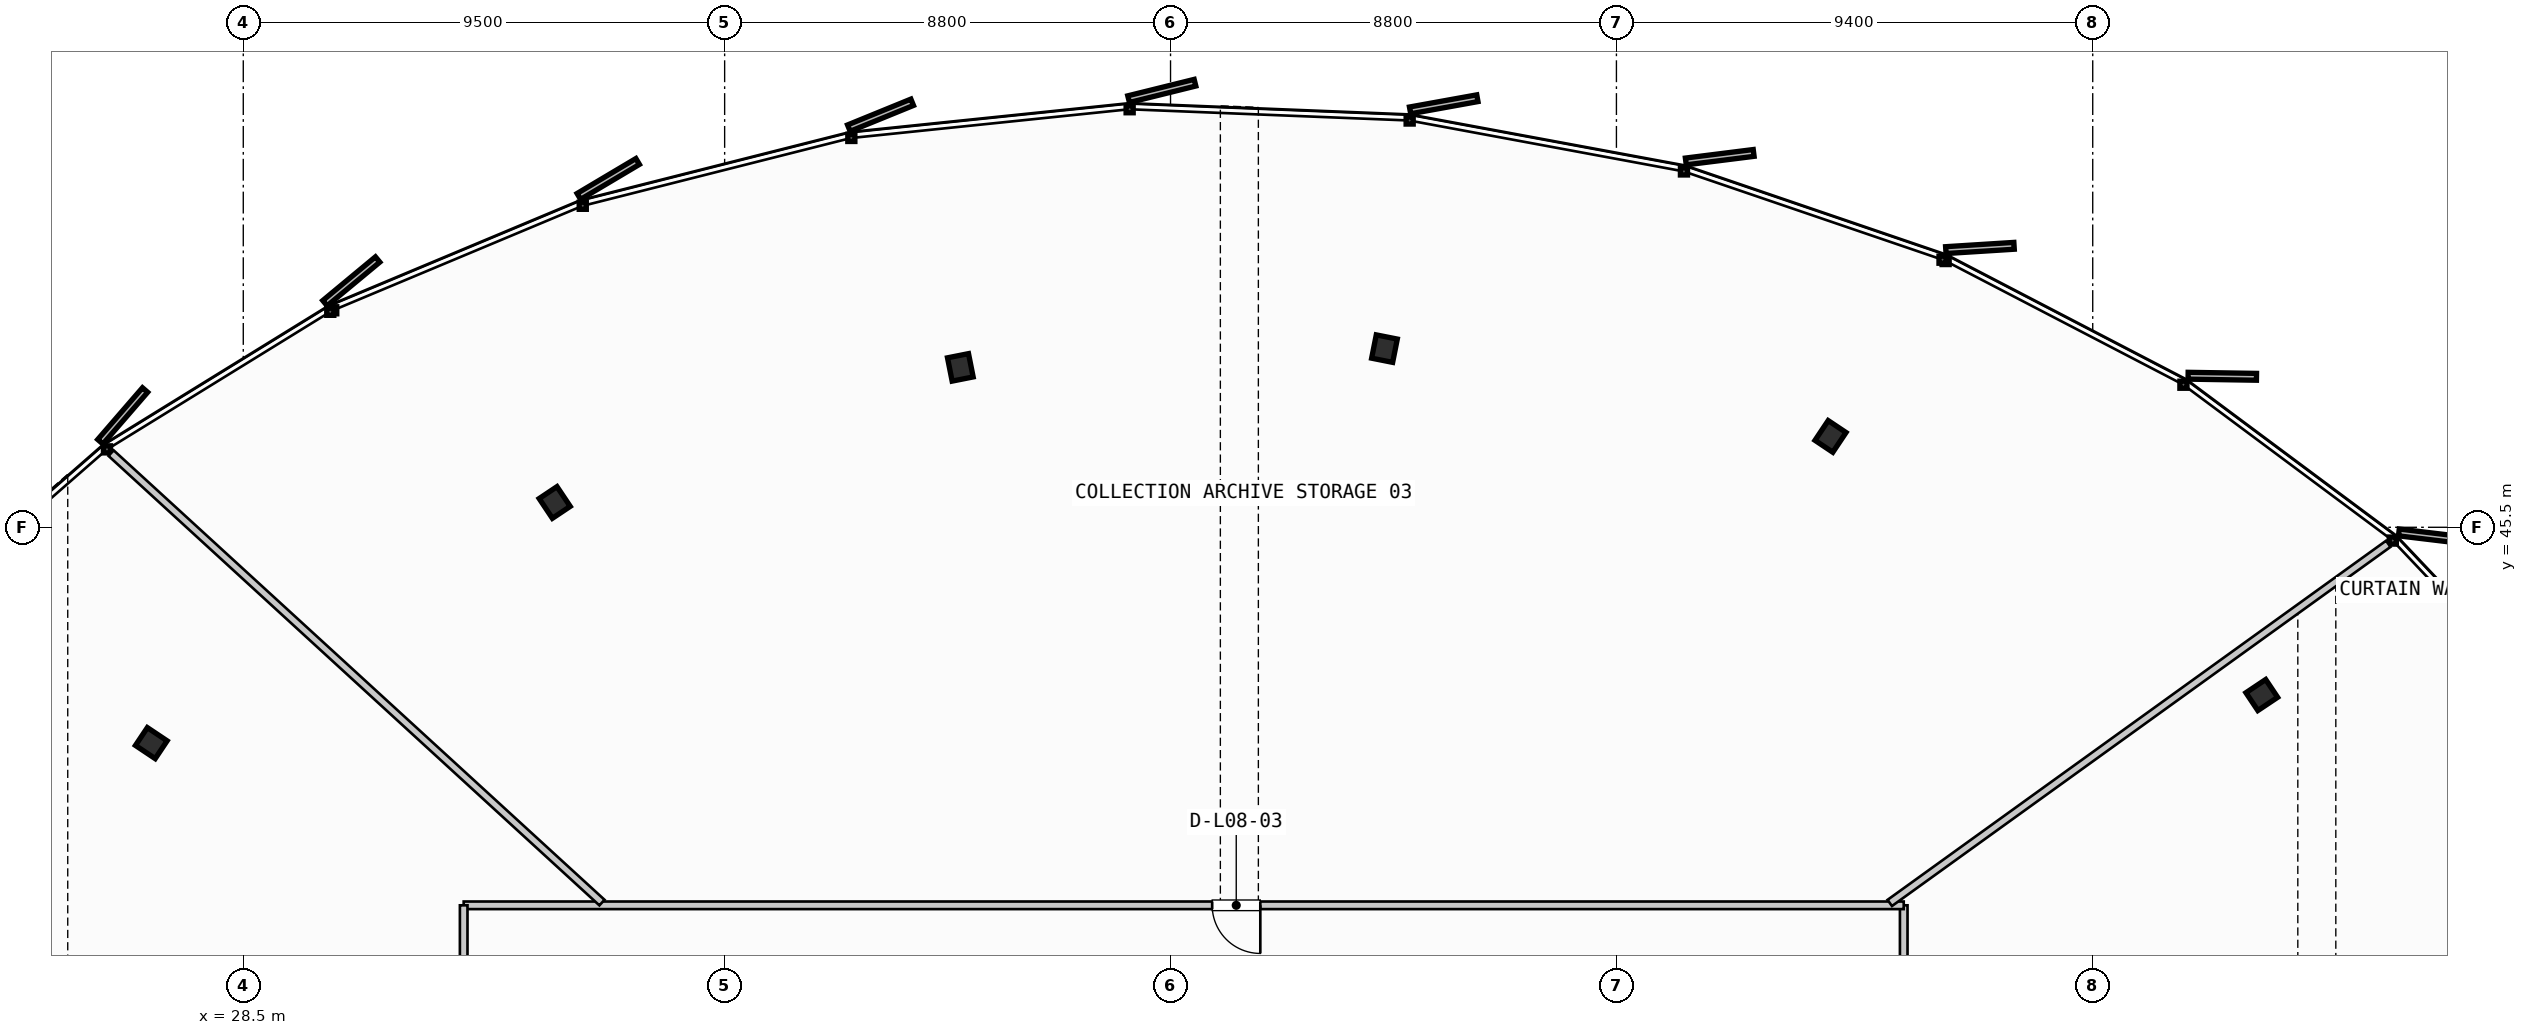
"""IFC4 building model, lengths in metres.
Left out: names, types, materials, properties, quantities, classifications, styles, units other than length and angle.
Written with IfcOpenShell. Run it as: python <this file> out.ifc"""

import sys

from ifc_helpers import new_model, si_unit, direction, frame, frame_2d, origin, origin_2d, place, context, subcontext, project, spatial, rectangle, i_section, extrude, source, transform, mapped, element, fill, save


model = new_model("IFC4")
c1 = context("Model", 3, precision=1e-05, world=origin(), true_north=direction((0.0, 1.0)))
c2 = subcontext(c1, "Body", "Model", "MODEL_VIEW")
j1 = project(units=[si_unit("LENGTHUNIT", "METRE"), si_unit("PLANEANGLEUNIT", "RADIAN")], contexts=[c1])
p1 = place(None, origin())
s1 = spatial("IfcSite", under=j1, at=p1, CompositionType="ELEMENT")
p2 = place(p1, origin())
s2 = spatial("IfcBuilding", under=s1, at=p2, CompositionType="ELEMENT")
p3 = place(p2, frame((0.0, 0.0, 37.2)))
s3 = spatial("IfcBuildingStorey", under=s2, at=p3, CompositionType="ELEMENT", Elevation=37.2)
m1 = source(origin(), c2, "Body", "SweptSolid", [
    extrude(i_section(OverallWidth=0.423, OverallDepth=0.469, WebThickness=0.051, FlangeThickness=0.081, FilletRadius=0.015, at=origin_2d()), origin(), (0.0, 0.0, 1.0), 3.55),
])
for number, where, z_axis, x_axis in (
    (1, (68.336, 42.19, 0.0), (0.0, 0.0, 1.0), (0.831, 0.556, 0.0)),
    (2, (59.825, 47.293, 0.0), (0.0, 0.0, 1.0), (0.556, 0.831, 0.0)),
    (3, (51.022, 49.026, 0.0), (0.0, 0.0, 1.0), (0.195, 0.981, 0.0)),
    (4, (42.652, 48.656, 0.0), (0.0, 0.0, 1.0), (-0.195, 0.981, 0.0)),
    (5, (34.646, 45.99, 0.0), (0.0, 0.0, 1.0), (-0.556, 0.831, 0.0)),
    (6, (26.685, 41.241, 0.0), (0.0, 0.0, 1.0), (-0.831, 0.556, 0.0)),
):
    element("IfcColumn", number, at=place(p3, frame(where, z_axis=z_axis, x_axis=x_axis)), inside=s3, PredefinedType="COLUMN", context=c2, shape_type="MappedRepresentation", body=[
        mapped(m1, transform((0.0, 0.0, 0.0), scale=1.0)),
    ])
p4 = place(p3, frame((61.27, 17.98, 0.0), z_axis=(0.0, 0.0, 1.0), x_axis=(0.0, 1.0, 0.0)))
e7 = element("IfcWall", 7, at=p4, inside=s3, PredefinedType="PARTITIONING", context=c2, shape_type="SweptSolid", body=[
    extrude(rectangle(XDim=20.06, YDim=0.15, at=frame_2d((10.03, 0.0))), origin(), (0.0, 0.0, 1.0), 2.925),
])
p5 = place(p4, frame((9.555, 0.0, 0.0)))
e8 = element("IfcOpeningElement", 8, at=p5, cuts=e7, PredefinedType="OPENING", context=c2, shape_type="SweptSolid", body=[
    extrude(rectangle(XDim=0.95, YDim=2.15, at=frame_2d((0.475, 1.075))), frame((0.0, 0.085, 0.0), z_axis=(0.0, -1.0, 0.0), x_axis=(1.0, 0.0, 0.0)), (0.0, 0.0, 1.0), 0.17),
])
p6 = place(p3, frame((61.27, 38.04, 0.0), z_axis=(0.0, 0.0, 1.0), x_axis=(-1.0, 0.0, 0.0)))
e9 = element("IfcWall", 9, at=p6, inside=s3, PredefinedType="PARTITIONING", context=c2, shape_type="SweptSolid", body=[
    extrude(rectangle(XDim=28.42, YDim=0.15, at=frame_2d((14.21, 0.0))), origin(), (0.0, 0.0, 1.0), 2.925),
])
p7 = place(p6, frame((12.698, 0.0, 0.0)))
e10 = element("IfcOpeningElement", 10, at=p7, cuts=e9, PredefinedType="OPENING", context=c2, shape_type="SweptSolid", body=[
    extrude(rectangle(XDim=0.95, YDim=2.15, at=frame_2d((0.475, 1.075))), frame((0.0, 0.085, 0.0), z_axis=(0.0, -1.0, 0.0), x_axis=(1.0, 0.0, 0.0)), (0.0, 0.0, 1.0), 0.17),
])
p8 = place(p3, frame((32.85, 38.04, 0.0), z_axis=(0.0, 0.0, 1.0), x_axis=(0.0, -1.0, 0.0)))
e11 = element("IfcWall", 11, at=p8, inside=s3, PredefinedType="PARTITIONING", context=c2, shape_type="SweptSolid", body=[
    extrude(rectangle(XDim=20.06, YDim=0.15, at=frame_2d((10.03, 0.0))), origin(), (0.0, 0.0, 1.0), 2.925),
])
p9 = place(p8, frame((9.555, 0.0, 0.0)))
e12 = element("IfcOpeningElement", 12, at=p9, cuts=e11, PredefinedType="OPENING", context=c2, shape_type="SweptSolid", body=[
    extrude(rectangle(XDim=0.95, YDim=2.15, at=frame_2d((0.475, 1.075))), frame((0.0, 0.085, 0.0), z_axis=(0.0, -1.0, 0.0), x_axis=(1.0, 0.0, 0.0)), (0.0, 0.0, 1.0), 0.17),
])
p10 = place(p3, frame((60.994, 38.087, 0.0), z_axis=(0.0, 0.0, 1.0), x_axis=(0.811422427455, 0.584460130567, 0.0)))
e13 = element("IfcWall", 13, at=p10, inside=s3, PredefinedType="PARTITIONING", context=c2, shape_type="SweptSolid", body=[
    extrude(rectangle(XDim=12.125, YDim=0.15, at=frame_2d((6.062, 0.0))), origin(), (0.0, 0.0, 1.0), 2.925),
])
p11 = place(p3, frame((35.579, 38.094, 0.0), z_axis=(0.0, 0.0, 1.0), x_axis=(-0.737564479252, 0.675276712871, 0.0)))
e14 = element("IfcWall", 14, at=p11, inside=s3, PredefinedType="PARTITIONING", context=c2, shape_type="SweptSolid", body=[
    extrude(rectangle(XDim=13.135, YDim=0.15, at=frame_2d((6.567, 0.0))), origin(), (0.0, 0.0, 1.0), 2.925),
])
m2 = source(origin(), c2, "Body", "SweptSolid", [
    extrude(rectangle(XDim=0.95, YDim=2.15, at=frame_2d((0.475, 1.075))), frame((0.0, 0.025, 0.0), z_axis=(0.0, -1.0, 0.0), x_axis=(1.0, 0.0, 0.0)), (0.0, 0.0, 1.0), 0.05),
])
p12 = place(p7, origin())
e15 = element("IfcDoor", 15, at=p12, inside=s3, OperationType="SINGLE_SWING_LEFT", PredefinedType="DOOR", context=c2, shape_type="MappedRepresentation", body=[
    mapped(m2, transform((0.0, 0.0, 0.0), scale=1.0)),
])
fill(e10, e15)
save(model, sys.argv[1])
